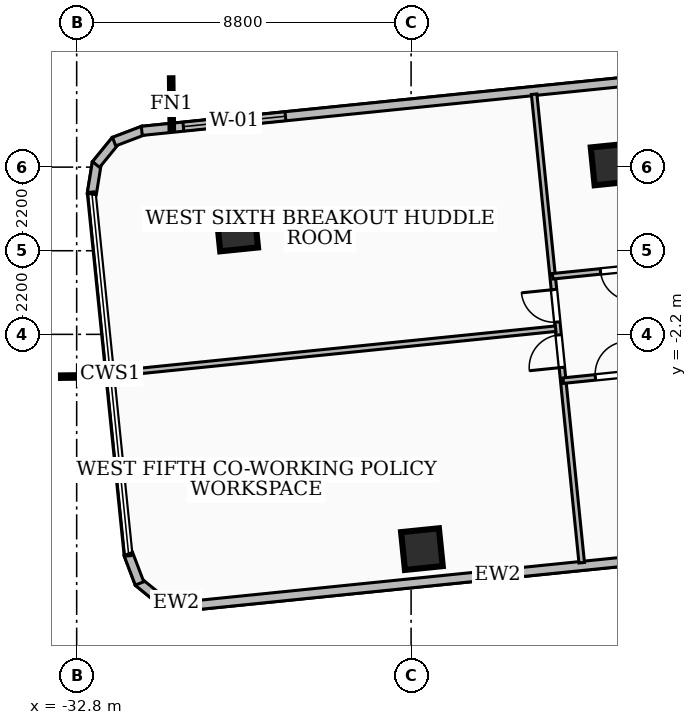
"""IFC4 building model, lengths in metres.
Left out: names, types, materials, properties, quantities, classifications, styles, units other than length and angle.
Written with IfcOpenShell. Run it as: python <this file> out.ifc"""

import sys

from ifc_helpers import new_model, si_unit, direction, frame, frame_2d, origin, origin_2d, place, context, subcontext, project, spatial, rectangle, extrude, element, fill, save


model = new_model("IFC4")
c1 = context("Model", 3, precision=1e-05, world=origin(), true_north=direction((0.0, 1.0)))
c2 = subcontext(c1, "Body", "Model", "MODEL_VIEW")
j1 = project(units=[si_unit("LENGTHUNIT", "METRE"), si_unit("PLANEANGLEUNIT", "RADIAN")], contexts=[c1])
p1 = place(None, origin())
s1 = spatial("IfcSite", under=j1, at=p1, CompositionType="ELEMENT")
p2 = place(p1, origin())
s2 = spatial("IfcBuilding", under=s1, at=p2, CompositionType="ELEMENT")
p3 = place(p2, frame((0.0, 0.0, 74.88)))
s3 = spatial("IfcBuildingStorey", under=s2, at=p3, CompositionType="ELEMENT", Elevation=74.88)
for number, where, z_axis, x_axis in (
    (1, (-18.724, 2.271, 0.0), (0.0, 0.0, 1.0), (0.995, 0.101, 0.0)),
    (2, (-28.576, 0.533, 0.0), (0.0, 0.0, 1.0), (0.995, 0.101, 0.0)),
    (3, (-23.715, -7.851, 0.0), (0.0, 0.0, 1.0), (0.995, 0.101, 0.0)),
):
    element("IfcColumn", number, at=place(p3, frame(where, z_axis=z_axis, x_axis=x_axis)), inside=s3, PredefinedType="COLUMN", context=c2, shape_type="SweptSolid", body=[
        extrude(rectangle(XDim=1.0, YDim=1.0, at=origin_2d()), origin(), (0.0, 0.0, 1.0), 3.6),
    ])
p4 = place(p3, frame((-13.626, -7.696, 0.0), z_axis=(0.0, 0.0, 1.0), x_axis=(-0.994872930989, -0.101132839298, 0.0)))
e4 = element("IfcWall", 4, at=p4, inside=s3, PredefinedType="SOLIDWALL", context=c2, shape_type="SweptSolid", body=[
    extrude(rectangle(XDim=16.276, YDim=0.24, at=frame_2d((8.138, 0.0))), origin(), (0.0, 0.0, 1.0), 2.644),
])
p5 = place(p3, frame((-29.768, -9.343, 0.0), z_axis=(0.0, 0.0, 1.0), x_axis=(-0.987084128833, 0.160202754679, 0.0)))
e5 = element("IfcWall", 5, at=p5, inside=s3, PredefinedType="SOLIDWALL", context=c2, shape_type="SweptSolid", body=[
    extrude(rectangle(XDim=0.831, YDim=0.24, at=frame_2d((0.415, 0.0))), origin(), (0.0, 0.0, 1.0), 3.34),
])
p6 = place(p3, frame((-30.544, -9.23, 0.0), z_axis=(0.0, 0.0, 1.0), x_axis=(-0.774358164226, 0.632747527452, 0.0)))
e6 = element("IfcWall", 6, at=p6, inside=s3, PredefinedType="SOLIDWALL", context=c2, shape_type="SweptSolid", body=[
    extrude(rectangle(XDim=0.814, YDim=0.24, at=frame_2d((0.407, 0.0))), origin(), (0.0, 0.0, 1.0), 3.34),
])
p7 = place(p3, frame((-31.146, -8.754, 0.0), z_axis=(0.0, 0.0, 1.0), x_axis=(-0.355701438235, 0.934599639866, 0.0)))
e7 = element("IfcWall", 7, at=p7, inside=s3, PredefinedType="SOLIDWALL", context=c2, shape_type="SweptSolid", body=[
    extrude(rectangle(XDim=0.829, YDim=0.24, at=frame_2d((0.415, 0.0))), origin(), (0.0, 0.0, 1.0), 3.34),
])
p8 = place(p3, frame((-32.403, 1.493, 0.0), z_axis=(0.0, 0.0, 1.0), x_axis=(0.160156284613, 0.987091669755, 0.0)))
e8 = element("IfcWall", 8, at=p8, inside=s3, PredefinedType="SOLIDWALL", context=c2, shape_type="SweptSolid", body=[
    extrude(rectangle(XDim=0.831, YDim=0.24, at=frame_2d((0.416, 0.0))), origin(), (0.0, 0.0, 1.0), 3.34),
])
p9 = place(p3, frame((-32.29, 2.269, 0.0), z_axis=(0.0, 0.0, 1.0), x_axis=(0.632354425822, 0.774679211121, 0.0)))
e9 = element("IfcWall", 9, at=p9, inside=s3, PredefinedType="SOLIDWALL", context=c2, shape_type="SweptSolid", body=[
    extrude(rectangle(XDim=0.813, YDim=0.24, at=frame_2d((0.406, 0.0))), origin(), (0.0, 0.0, 1.0), 3.34),
])
p10 = place(p3, frame((-31.815, 2.871, 0.0), z_axis=(0.0, 0.0, 1.0), x_axis=(0.934748415991, 0.355310285248, 0.0)))
e10 = element("IfcWall", 10, at=p10, inside=s3, PredefinedType="SOLIDWALL", context=c2, shape_type="SweptSolid", body=[
    extrude(rectangle(XDim=0.83, YDim=0.24, at=frame_2d((0.415, 0.0))), origin(), (0.0, 0.0, 1.0), 3.34),
])
p11 = place(p3, frame((-31.087, 3.154, 0.0), z_axis=(0.0, 0.0, 1.0), x_axis=(0.994872777564, 0.101134348577, 0.0)))
e11 = element("IfcWall", 11, at=p11, inside=s3, PredefinedType="SOLIDWALL", context=c2, shape_type="SweptSolid", body=[
    extrude(rectangle(XDim=16.275, YDim=0.24, at=frame_2d((8.138, 0.0))), origin(), (0.0, 0.0, 1.0), 3.34),
])
p12 = place(p11, frame((1.1, 0.0, 0.85)))
e12 = element("IfcOpeningElement", 12, at=p12, cuts=e11, PredefinedType="OPENING", context=c2, shape_type="SweptSolid", body=[
    extrude(rectangle(XDim=2.7, YDim=2.1, at=frame_2d((1.35, 1.05))), frame((0.0, 0.13, 0.0), z_axis=(0.0, -1.0, 0.0), x_axis=(1.0, 0.0, 0.0)), (0.0, 0.0, 1.0), 0.26),
])
p13 = place(p3, frame((-19.997, -3.418, 0.0), z_axis=(0.0, 0.0, 1.0), x_axis=(0.994885342511, 0.101010669028, 0.0)))
e13 = element("IfcWall", 13, at=p13, inside=s3, PredefinedType="PARTITIONING", context=c2, shape_type="SweptSolid", body=[
    extrude(rectangle(XDim=5.951, YDim=0.145, at=frame_2d((2.975, 0.0))), origin(), (0.0, 0.0, 1.0), 3.34),
])
p14 = place(p13, frame((3.825, 0.0, 0.0)))
e14 = element("IfcOpeningElement", 14, at=p14, cuts=e13, PredefinedType="OPENING", context=c2, shape_type="SweptSolid", body=[
    extrude(rectangle(XDim=0.86, YDim=2.04, at=frame_2d((0.43, 1.02))), frame((0.0, 0.083, 0.0), z_axis=(0.0, -1.0, 0.0), x_axis=(1.0, 0.0, 0.0)), (0.0, 0.0, 1.0), 0.165),
])
p15 = place(p13, frame((0.85, 0.0, 0.0)))
e15 = element("IfcOpeningElement", 15, at=p15, cuts=e13, PredefinedType="OPENING", context=c2, shape_type="SweptSolid", body=[
    extrude(rectangle(XDim=0.86, YDim=2.04, at=frame_2d((0.43, 1.02))), frame((0.0, 0.083, 0.0), z_axis=(0.0, -1.0, 0.0), x_axis=(1.0, 0.0, 0.0)), (0.0, 0.0, 1.0), 0.165),
])
p16 = place(p3, frame((-14.356, -0.071, 0.0), z_axis=(0.0, 0.0, 1.0), x_axis=(-0.994884923871, -0.101014792254, 0.0)))
e16 = element("IfcWall", 16, at=p16, inside=s3, PredefinedType="PARTITIONING", context=c2, shape_type="SweptSolid", body=[
    extrude(rectangle(XDim=5.95, YDim=0.145, at=frame_2d((2.975, 0.0))), origin(), (0.0, 0.0, 1.0), 3.34),
])
p17 = place(p16, frame((0.85, 0.0, 0.0)))
e17 = element("IfcOpeningElement", 17, at=p17, cuts=e16, PredefinedType="OPENING", context=c2, shape_type="SweptSolid", body=[
    extrude(rectangle(XDim=0.86, YDim=2.04, at=frame_2d((0.43, 1.02))), frame((0.0, 0.083, 0.0), z_axis=(0.0, -1.0, 0.0), x_axis=(1.0, 0.0, 0.0)), (0.0, 0.0, 1.0), 0.165),
])
p18 = place(p16, frame((3.825, 0.0, 0.0)))
e18 = element("IfcOpeningElement", 18, at=p18, cuts=e16, PredefinedType="OPENING", context=c2, shape_type="SweptSolid", body=[
    extrude(rectangle(XDim=0.86, YDim=2.04, at=frame_2d((0.43, 1.02))), frame((0.0, 0.083, 0.0), z_axis=(0.0, -1.0, 0.0), x_axis=(1.0, 0.0, 0.0)), (0.0, 0.0, 1.0), 0.165),
])
p19 = place(p3, frame((-20.196, -2.051, 0.0), z_axis=(0.0, 0.0, 1.0), x_axis=(-0.994871935232, -0.101142634371, 0.0)))
e19 = element("IfcWall", 19, at=p19, inside=s3, PredefinedType="PARTITIONING", context=c2, shape_type="SweptSolid", body=[
    extrude(rectangle(XDim=11.695, YDim=0.145, at=frame_2d((5.848, 0.0))), origin(), (0.0, 0.0, 1.0), 2.793),
])
p20 = place(p3, frame((-19.51, -8.209, 0.0), z_axis=(0.0, 0.0, 1.0), x_axis=(-0.101042864496, 0.99488207318, 0.0)))
e20 = element("IfcWall", 20, at=p20, inside=s3, PredefinedType="PARTITIONING", context=c2, shape_type="SweptSolid", body=[
    extrude(rectangle(XDim=12.39, YDim=0.145, at=frame_2d((6.195, 0.0))), origin(), (0.0, 0.0, 1.0), 2.486),
])
p21 = place(p20, frame((6.365, 0.0, 0.0)))
e21 = element("IfcOpeningElement", 21, at=p21, cuts=e20, PredefinedType="OPENING", context=c2, shape_type="SweptSolid", body=[
    extrude(rectangle(XDim=0.86, YDim=2.04, at=frame_2d((0.43, 1.02))), frame((0.0, 0.083, 0.0), z_axis=(0.0, -1.0, 0.0), x_axis=(1.0, 0.0, 0.0)), (0.0, 0.0, 1.0), 0.165),
])
p22 = place(p20, frame((5.165, 0.0, 0.0)))
e22 = element("IfcOpeningElement", 22, at=p22, cuts=e20, PredefinedType="OPENING", context=c2, shape_type="SweptSolid", body=[
    extrude(rectangle(XDim=0.86, YDim=2.04, at=frame_2d((0.43, 1.02))), frame((0.0, 0.083, 0.0), z_axis=(0.0, -1.0, 0.0), x_axis=(1.0, 0.0, 0.0)), (0.0, 0.0, 1.0), 0.165),
])
p23 = place(p12, origin())
e23 = element("IfcWindow", 23, at=p23, inside=s3, PartitioningType="SINGLE_PANEL", PredefinedType="WINDOW", context=c2, shape_type="SweptSolid", body=[
    extrude(rectangle(XDim=2.7, YDim=2.1, at=frame_2d((1.35, 1.05))), frame((0.0, 0.03, 0.0), z_axis=(0.0, -1.0, 0.0), x_axis=(1.0, 0.0, 0.0)), (0.0, 0.0, 1.0), 0.06),
])
fill(e12, e23)
p24 = place(p15, origin())
e24 = element("IfcDoor", 24, at=p24, inside=s3, OperationType="SINGLE_SWING_RIGHT", PredefinedType="DOOR", context=c2, shape_type="SweptSolid", body=[
    extrude(rectangle(XDim=0.86, YDim=2.04, at=frame_2d((0.43, 1.02))), frame((0.0, 0.025, 0.0), z_axis=(0.0, -1.0, 0.0), x_axis=(1.0, 0.0, 0.0)), (0.0, 0.0, 1.0), 0.05),
])
fill(e15, e24)
p25 = place(p18, origin())
e25 = element("IfcDoor", 25, at=p25, inside=s3, OperationType="SINGLE_SWING_LEFT", PredefinedType="DOOR", context=c2, shape_type="SweptSolid", body=[
    extrude(rectangle(XDim=0.86, YDim=2.04, at=frame_2d((0.43, 1.02))), frame((0.0, 0.025, 0.0), z_axis=(0.0, -1.0, 0.0), x_axis=(1.0, 0.0, 0.0)), (0.0, 0.0, 1.0), 0.05),
])
fill(e18, e25)
p26 = place(p21, origin())
e26 = element("IfcDoor", 26, at=p26, inside=s3, OperationType="SINGLE_SWING_RIGHT", PredefinedType="DOOR", context=c2, shape_type="SweptSolid", body=[
    extrude(rectangle(XDim=0.86, YDim=2.04, at=frame_2d((0.43, 1.02))), frame((0.0, 0.025, 0.0), z_axis=(0.0, -1.0, 0.0), x_axis=(1.0, 0.0, 0.0)), (0.0, 0.0, 1.0), 0.05),
])
fill(e21, e26)
p27 = place(p22, origin())
e27 = element("IfcDoor", 27, at=p27, inside=s3, OperationType="SINGLE_SWING_LEFT", PredefinedType="DOOR", context=c2, shape_type="SweptSolid", body=[
    extrude(rectangle(XDim=0.86, YDim=2.04, at=frame_2d((0.43, 1.02))), frame((0.0, 0.025, 0.0), z_axis=(0.0, -1.0, 0.0), x_axis=(1.0, 0.0, 0.0)), (0.0, 0.0, 1.0), 0.05),
])
fill(e22, e27)
save(model, sys.argv[1])
